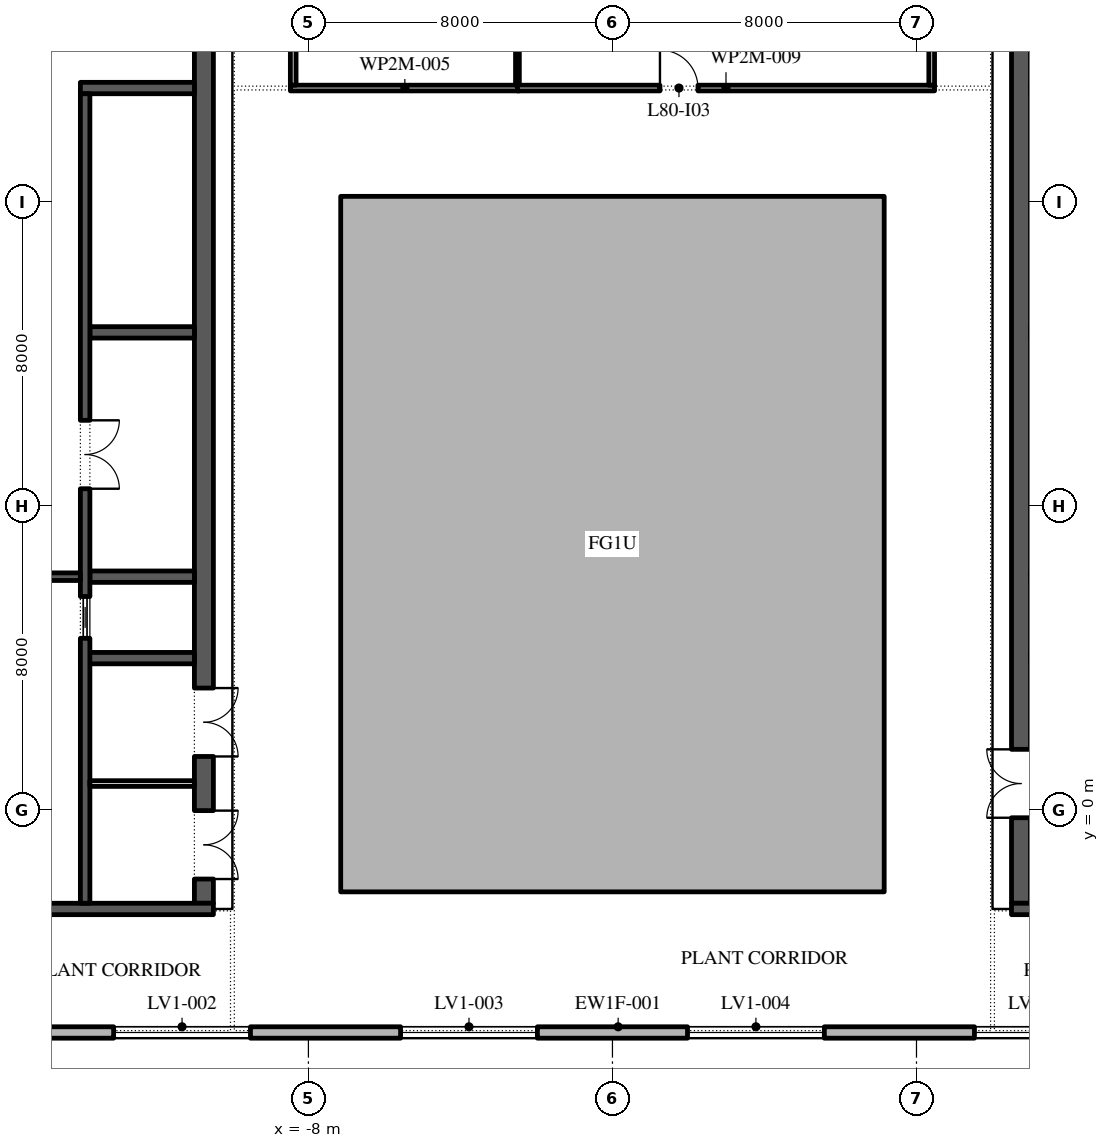
"""IFC4 building model, lengths in metres.
Left out: names, types, materials, properties, quantities, classifications, styles, units other than length and angle.
Written with IfcOpenShell. Run it as: python <this file> out.ifc"""

import sys

from ifc_helpers import new_model, si_unit, direction, frame, frame_2d, origin, place, context, subcontext, project, spatial, polyline, rectangle, outline, extrude, element, fill, save


model = new_model("IFC4")
c1 = context("Model", 3, precision=1e-05, world=origin(), true_north=direction((0.0, 1.0)))
c2 = subcontext(c1, "Body", "Model", "MODEL_VIEW")
j1 = project(units=[si_unit("LENGTHUNIT", "METRE"), si_unit("PLANEANGLEUNIT", "RADIAN")], contexts=[c1])
p1 = place(None, origin())
s1 = spatial("IfcSite", under=j1, at=p1, CompositionType="ELEMENT")
p2 = place(p1, origin())
s2 = spatial("IfcBuilding", under=s1, at=p2, CompositionType="ELEMENT")
p3 = place(p2, frame((0.0, 0.0, 363.6)))
s3 = spatial("IfcBuildingStorey", under=s2, at=p3, CompositionType="ELEMENT", Elevation=363.6)
p4 = place(p3, origin())
e1 = element("IfcWall", 1, at=p4, inside=s3, PredefinedType="STANDARD", context=c2, shape_type="SweptSolid", body=[
    extrude(outline(polyline([(-7.15, -2.15), (7.15, -2.15), (7.15, 16.15), (-7.15, 16.15), (-7.15, -2.15)]), holes=[polyline([(-7.0, -2.0), (-7.0, 16.0), (7.0, 16.0), (7.0, -2.0), (-7.0, -2.0)])]), origin(), (0.0, 0.0, 1.0), 5.2),
])
p5 = place(p3, frame((-22.35, -5.85, 0.0), z_axis=(0.0, 0.0, 1.0), x_axis=(1.0, 0.0, 0.0)))
e2 = element("IfcWall", 2, at=p5, inside=s3, PredefinedType="STANDARD", context=c2, shape_type="SweptSolid", body=[
    extrude(rectangle(XDim=45.0, YDim=0.3, at=frame_2d((22.5, 0.0))), origin(), (0.0, 0.0, 1.0), 5.2),
])
p6 = place(p5, frame((1.825, 0.0, 0.6)))
e3 = element("IfcOpeningElement", 3, at=p6, cuts=e2, PredefinedType="OPENING", context=c2, shape_type="SweptSolid", body=[
    extrude(rectangle(XDim=3.6, YDim=4.15, at=frame_2d((1.8, 2.075))), frame((0.0, 0.16, 0.0), z_axis=(0.0, -1.0, 0.0), x_axis=(1.0, 0.0, 0.0)), (0.0, 0.0, 1.0), 0.32),
])
p7 = place(p5, frame((9.225, 0.0, 0.6)))
e4 = element("IfcOpeningElement", 4, at=p7, cuts=e2, PredefinedType="OPENING", context=c2, shape_type="SweptSolid", body=[
    extrude(rectangle(XDim=3.6, YDim=4.15, at=frame_2d((1.8, 2.075))), frame((0.0, 0.16, 0.0), z_axis=(0.0, -1.0, 0.0), x_axis=(1.0, 0.0, 0.0)), (0.0, 0.0, 1.0), 0.32),
])
p8 = place(p5, frame((16.775, 0.0, 0.6)))
e5 = element("IfcOpeningElement", 5, at=p8, cuts=e2, PredefinedType="OPENING", context=c2, shape_type="SweptSolid", body=[
    extrude(rectangle(XDim=3.6, YDim=4.15, at=frame_2d((1.8, 2.075))), frame((0.0, 0.16, 0.0), z_axis=(0.0, -1.0, 0.0), x_axis=(1.0, 0.0, 0.0)), (0.0, 0.0, 1.0), 0.32),
])
p9 = place(p5, frame((24.325, 0.0, 0.6)))
e6 = element("IfcOpeningElement", 6, at=p9, cuts=e2, PredefinedType="OPENING", context=c2, shape_type="SweptSolid", body=[
    extrude(rectangle(XDim=3.6, YDim=4.15, at=frame_2d((1.8, 2.075))), frame((0.0, 0.16, 0.0), z_axis=(0.0, -1.0, 0.0), x_axis=(1.0, 0.0, 0.0)), (0.0, 0.0, 1.0), 0.32),
])
p10 = place(p5, frame((31.875, 0.0, 0.6)))
e7 = element("IfcOpeningElement", 7, at=p10, cuts=e2, PredefinedType="OPENING", context=c2, shape_type="SweptSolid", body=[
    extrude(rectangle(XDim=3.6, YDim=4.15, at=frame_2d((1.8, 2.075))), frame((0.0, 0.16, 0.0), z_axis=(0.0, -1.0, 0.0), x_axis=(1.0, 0.0, 0.0)), (0.0, 0.0, 1.0), 0.32),
])
p11 = place(p5, frame((39.425, 0.0, 0.6)))
e8 = element("IfcOpeningElement", 8, at=p11, cuts=e2, PredefinedType="OPENING", context=c2, shape_type="SweptSolid", body=[
    extrude(rectangle(XDim=3.6, YDim=4.15, at=frame_2d((1.8, 2.075))), frame((0.0, 0.16, 0.0), z_axis=(0.0, -1.0, 0.0), x_axis=(1.0, 0.0, 0.0)), (0.0, 0.0, 1.0), 0.32),
])
p12 = place(p3, frame((-10.75, -2.45, 0.0), z_axis=(0.0, 0.0, 1.0), x_axis=(0.0, 1.0, 0.0)))
e9 = element("IfcWall", 9, at=p12, inside=s3, PredefinedType="SHEAR", context=c2, shape_type="SweptSolid", body=[
    extrude(rectangle(XDim=27.9, YDim=0.5, at=frame_2d((13.95, 0.0))), origin(), (0.0, 0.0, 1.0), 5.2),
])
p13 = place(p12, frame((23.65, 0.0, 0.0)))
e10 = element("IfcOpeningElement", 10, at=p13, cuts=e9, PredefinedType="OPENING", context=c2, shape_type="SweptSolid", body=[
    extrude(rectangle(XDim=2.4, YDim=2.1, at=frame_2d((1.2, 1.05))), frame((0.0, 0.26, 0.0), z_axis=(0.0, -1.0, 0.0), x_axis=(1.0, 0.0, 0.0)), (0.0, 0.0, 1.0), 0.52),
])
p14 = place(p12, frame((0.637, 0.0, 0.0)))
e11 = element("IfcOpeningElement", 11, at=p14, cuts=e9, PredefinedType="OPENING", context=c2, shape_type="SweptSolid", body=[
    extrude(rectangle(XDim=1.8, YDim=2.4, at=frame_2d((0.9, 1.2))), frame((0.0, 0.26, 0.0), z_axis=(0.0, -1.0, 0.0), x_axis=(1.0, 0.0, 0.0)), (0.0, 0.0, 1.0), 0.52),
])
p15 = place(p12, frame((3.863, 0.0, 0.0)))
e12 = element("IfcOpeningElement", 12, at=p15, cuts=e9, PredefinedType="OPENING", context=c2, shape_type="SweptSolid", body=[
    extrude(rectangle(XDim=1.8, YDim=2.4, at=frame_2d((0.9, 1.2))), frame((0.0, 0.26, 0.0), z_axis=(0.0, -1.0, 0.0), x_axis=(1.0, 0.0, 0.0)), (0.0, 0.0, 1.0), 0.52),
])
p16 = place(p3, frame((-21.5, -2.6, 0.0), z_axis=(0.0, 0.0, 1.0), x_axis=(1.0, 0.0, 0.0)))
e13 = element("IfcWall", 13, at=p16, inside=s3, PredefinedType="SHEAR", context=c2, shape_type="SweptSolid", body=[
    extrude(rectangle(XDim=11.0, YDim=0.3, at=frame_2d((5.5, 0.0))), origin(), (0.0, 0.0, 1.0), 5.2),
])
p17 = place(p3, frame((-14.0, 4.0, 0.0), z_axis=(0.0, 0.0, 1.0), x_axis=(1.0, 0.0, 0.0)))
e14 = element("IfcWall", 14, at=p17, inside=s3, PredefinedType="SHEAR", context=c2, shape_type="SweptSolid", body=[
    extrude(rectangle(XDim=3.0, YDim=0.3, at=frame_2d((1.5, 0.0))), origin(), (0.0, 0.0, 1.0), 5.2),
])
for number, where, z_axis, x_axis in (
    (15, (-13.75, 6.143, 0.0), (0.0, 0.0, 1.0), (1.0, 0.0, 0.0)),
    (16, (-13.75, 12.571, 0.0), (0.0, 0.0, 1.0), (1.0, 0.0, 0.0)),
):
    element("IfcWall", number, at=place(p3, frame(where, z_axis=z_axis, x_axis=x_axis)), inside=s3, PredefinedType="SHEAR", context=c2, shape_type="SweptSolid", body=[
        extrude(rectangle(XDim=2.75, YDim=0.3, at=frame_2d((1.375, 0.0))), origin(), (0.0, 0.0, 1.0), 5.2),
    ])
p18 = place(p3, frame((-14.0, 19.0, 0.0), z_axis=(0.0, 0.0, 1.0), x_axis=(1.0, 0.0, 0.0)))
e17 = element("IfcWall", 17, at=p18, inside=s3, PredefinedType="SHEAR", context=c2, shape_type="SweptSolid", body=[
    extrude(rectangle(XDim=3.0, YDim=0.3, at=frame_2d((1.5, 0.0))), origin(), (0.0, 0.0, 1.0), 5.2),
])
p19 = place(p3, frame((-13.875, -2.45, 0.0), z_axis=(0.0, 0.0, 1.0), x_axis=(0.0, 1.0, 0.0)))
e18 = element("IfcWall", 18, at=p19, inside=s3, PredefinedType="SHEAR", context=c2, shape_type="SweptSolid", body=[
    extrude(rectangle(XDim=21.3, YDim=0.25, at=frame_2d((10.65, 0.0))), origin(), (0.0, 0.0, 1.0), 5.2),
])
p20 = place(p19, frame((10.907, 0.0, 0.0)))
e19 = element("IfcOpeningElement", 19, at=p20, cuts=e18, PredefinedType="OPENING", context=c2, shape_type="SweptSolid", body=[
    extrude(rectangle(XDim=1.8, YDim=2.4, at=frame_2d((0.9, 1.2))), frame((0.0, 0.135, 0.0), z_axis=(0.0, -1.0, 0.0), x_axis=(1.0, 0.0, 0.0)), (0.0, 0.0, 1.0), 0.27),
])
p21 = place(p19, frame((6.971, 0.0, 0.0)))
e20 = element("IfcOpeningElement", 20, at=p21, cuts=e18, PredefinedType="OPENING", context=c2, shape_type="SweptSolid", body=[
    extrude(rectangle(XDim=1.1, YDim=2.1, at=frame_2d((0.55, 1.05))), frame((0.0, 0.135, 0.0), z_axis=(0.0, -1.0, 0.0), x_axis=(1.0, 0.0, 0.0)), (0.0, 0.0, 1.0), 0.27),
])
p22 = place(p3, frame((-18.0, 6.143, 0.0), z_axis=(0.0, 0.0, 1.0), x_axis=(1.0, 0.0, 0.0)))
e21 = element("IfcWall", 21, at=p22, inside=s3, PredefinedType="SHEAR", context=c2, shape_type="SweptSolid", body=[
    extrude(rectangle(XDim=4.0, YDim=0.2, at=frame_2d((2.0, 0.0))), origin(), (0.0, 0.0, 1.0), 5.2),
])
p23 = place(p22, frame((1.4, 0.0, 0.0)))
e22 = element("IfcOpeningElement", 22, at=p23, cuts=e21, PredefinedType="OPENING", context=c2, shape_type="SweptSolid", body=[
    extrude(rectangle(XDim=1.2, YDim=2.1, at=frame_2d((0.6, 1.05))), frame((0.0, 0.11, 0.0), z_axis=(0.0, -1.0, 0.0), x_axis=(1.0, 0.0, 0.0)), (0.0, 0.0, 1.0), 0.22),
])
p24 = place(p3, frame((-13.75, 0.7, 0.0), z_axis=(0.0, 0.0, 1.0), x_axis=(1.0, 0.0, 0.0)))
e23 = element("IfcWall", 23, at=p24, inside=s3, PredefinedType="PARTITIONING", context=c2, shape_type="SweptSolid", body=[
    extrude(rectangle(XDim=2.75, YDim=0.15, at=frame_2d((1.375, 0.0))), origin(), (0.0, 0.0, 1.0), 5.2),
])
p25 = place(p3, frame((10.75, -2.45, 0.0), z_axis=(0.0, 0.0, 1.0), x_axis=(0.0, 1.0, 0.0)))
e24 = element("IfcWall", 24, at=p25, inside=s3, PredefinedType="SHEAR", context=c2, shape_type="SweptSolid", body=[
    extrude(rectangle(XDim=27.9, YDim=0.5, at=frame_2d((13.95, 0.0))), origin(), (0.0, 0.0, 1.0), 5.2),
])
p26 = place(p25, frame((23.65, 0.0, 0.0)))
e25 = element("IfcOpeningElement", 25, at=p26, cuts=e24, PredefinedType="OPENING", context=c2, shape_type="SweptSolid", body=[
    extrude(rectangle(XDim=2.4, YDim=2.1, at=frame_2d((1.2, 1.05))), frame((0.0, 0.26, 0.0), z_axis=(0.0, -1.0, 0.0), x_axis=(1.0, 0.0, 0.0)), (0.0, 0.0, 1.0), 0.52),
])
p27 = place(p25, frame((2.25, 0.0, 0.0)))
e26 = element("IfcOpeningElement", 26, at=p27, cuts=e24, PredefinedType="OPENING", context=c2, shape_type="SweptSolid", body=[
    extrude(rectangle(XDim=1.8, YDim=2.4, at=frame_2d((0.9, 1.2))), frame((0.0, 0.26, 0.0), z_axis=(0.0, -1.0, 0.0), x_axis=(1.0, 0.0, 0.0)), (0.0, 0.0, 1.0), 0.52),
])
p28 = place(p3, frame((10.5, -2.6, 0.0), z_axis=(0.0, 0.0, 1.0), x_axis=(1.0, 0.0, 0.0)))
e27 = element("IfcWall", 27, at=p28, inside=s3, PredefinedType="SHEAR", context=c2, shape_type="SweptSolid", body=[
    extrude(rectangle(XDim=11.0, YDim=0.3, at=frame_2d((5.5, 0.0))), origin(), (0.0, 0.0, 1.0), 5.2),
])
p29 = place(p3, frame((-8.475, 19.0, 0.0), z_axis=(0.0, 0.0, 1.0), x_axis=(1.0, 0.0, 0.0)))
e28 = element("IfcWall", 28, at=p29, inside=s3, PredefinedType="PARTITIONING", context=c2, shape_type="SweptSolid", body=[
    extrude(rectangle(XDim=6.025, YDim=0.15, at=frame_2d((3.013, 0.0))), origin(), (0.0, 0.0, 1.0), 5.2),
])
p30 = place(p3, frame((-8.4, 41.075, 0.0), z_axis=(0.0, 0.0, 1.0), x_axis=(0.0, -1.0, 0.0)))
e29 = element("IfcWall", 29, at=p30, inside=s3, PredefinedType="PARTITIONING", context=c2, shape_type="SweptSolid", body=[
    extrude(rectangle(XDim=22.0, YDim=0.15, at=frame_2d((11.0, 0.0))), origin(), (0.0, 0.0, 1.0), 5.2),
])
p31 = place(p30, frame((14.925, 0.0, 0.0)))
e30 = element("IfcOpeningElement", 30, at=p31, cuts=e29, PredefinedType="OPENING", context=c2, shape_type="SweptSolid", body=[
    extrude(rectangle(XDim=1.0, YDim=2.1, at=frame_2d((0.5, 1.05))), frame((0.0, 0.085, 0.0), z_axis=(0.0, -1.0, 0.0), x_axis=(1.0, 0.0, 0.0)), (0.0, 0.0, 1.0), 0.17),
])
p32 = place(p3, frame((-2.5, 19.075, 0.0), z_axis=(0.0, 0.0, 1.0), x_axis=(0.0, 1.0, 0.0)))
e31 = element("IfcWall", 31, at=p32, inside=s3, PredefinedType="PARTITIONING", context=c2, shape_type="SweptSolid", body=[
    extrude(rectangle(XDim=6.67, YDim=0.1, at=frame_2d((3.335, 0.0))), origin(), (0.0, 0.0, 1.0), 5.2),
])
p33 = place(p3, frame((-2.5, 19.0, 0.0), z_axis=(0.0, 0.0, 1.0), x_axis=(1.0, 0.0, 0.0)))
e32 = element("IfcWall", 32, at=p33, inside=s3, PredefinedType="PARTITIONING", context=c2, shape_type="SweptSolid", body=[
    extrude(rectangle(XDim=10.975, YDim=0.15, at=frame_2d((5.488, 0.0))), origin(), (0.0, 0.0, 1.0), 5.2),
])
p34 = place(p33, frame((3.75, 0.0, 0.0)))
e33 = element("IfcOpeningElement", 33, at=p34, cuts=e32, PredefinedType="OPENING", context=c2, shape_type="SweptSolid", body=[
    extrude(rectangle(XDim=1.0, YDim=2.1, at=frame_2d((0.5, 1.05))), frame((0.0, 0.085, 0.0), z_axis=(0.0, -1.0, 0.0), x_axis=(1.0, 0.0, 0.0)), (0.0, 0.0, 1.0), 0.17),
])
p35 = place(p3, frame((8.4, 19.075, 0.0), z_axis=(0.0, 0.0, 1.0), x_axis=(0.0, 1.0, 0.0)))
e34 = element("IfcWall", 34, at=p35, inside=s3, PredefinedType="PARTITIONING", context=c2, shape_type="SweptSolid", body=[
    extrude(rectangle(XDim=7.375, YDim=0.15, at=frame_2d((3.688, 0.0))), origin(), (0.0, 0.0, 1.0), 5.2),
])
p36 = place(p7, origin())
e35 = element("IfcWindow", 35, at=p36, inside=s3, PartitioningType="DOUBLE_PANEL_HORIZONTAL", PredefinedType="WINDOW", context=c2, shape_type="SweptSolid", body=[
    extrude(rectangle(XDim=3.6, YDim=4.15, at=frame_2d((1.8, 2.075))), frame((0.0, 0.03, 0.0), z_axis=(0.0, -1.0, 0.0), x_axis=(1.0, 0.0, 0.0)), (0.0, 0.0, 1.0), 0.06),
])
fill(e4, e35)
p37 = place(p8, origin())
e36 = element("IfcWindow", 36, at=p37, inside=s3, PartitioningType="DOUBLE_PANEL_HORIZONTAL", PredefinedType="WINDOW", context=c2, shape_type="SweptSolid", body=[
    extrude(rectangle(XDim=3.6, YDim=4.15, at=frame_2d((1.8, 2.075))), frame((0.0, 0.03, 0.0), z_axis=(0.0, -1.0, 0.0), x_axis=(1.0, 0.0, 0.0)), (0.0, 0.0, 1.0), 0.06),
])
fill(e5, e36)
p38 = place(p9, origin())
e37 = element("IfcWindow", 37, at=p38, inside=s3, PartitioningType="DOUBLE_PANEL_HORIZONTAL", PredefinedType="WINDOW", context=c2, shape_type="SweptSolid", body=[
    extrude(rectangle(XDim=3.6, YDim=4.15, at=frame_2d((1.8, 2.075))), frame((0.0, 0.03, 0.0), z_axis=(0.0, -1.0, 0.0), x_axis=(1.0, 0.0, 0.0)), (0.0, 0.0, 1.0), 0.06),
])
fill(e6, e37)
p39 = place(p10, origin())
e38 = element("IfcWindow", 38, at=p39, inside=s3, PartitioningType="DOUBLE_PANEL_HORIZONTAL", PredefinedType="WINDOW", context=c2, shape_type="SweptSolid", body=[
    extrude(rectangle(XDim=3.6, YDim=4.15, at=frame_2d((1.8, 2.075))), frame((0.0, 0.03, 0.0), z_axis=(0.0, -1.0, 0.0), x_axis=(1.0, 0.0, 0.0)), (0.0, 0.0, 1.0), 0.06),
])
fill(e7, e38)
p40 = place(p20, frame((1.8, -0.2, 0.0), z_axis=(0.0, 0.0, 1.0), x_axis=(-1.0, 0.0, 0.0)))
e39 = element("IfcDoor", 39, at=p40, inside=s3, OperationType="DOUBLE_DOOR_SINGLE_SWING", PredefinedType="DOOR", context=c2, shape_type="SweptSolid", body=[
    extrude(rectangle(XDim=1.8, YDim=2.4, at=frame_2d((0.9, 1.2))), frame((0.0, -0.075, 0.0), z_axis=(0.0, -1.0, 0.0), x_axis=(1.0, 0.0, 0.0)), (0.0, 0.0, 1.0), 0.05),
])
fill(e19, e39)
p41 = place(p21, origin())
e40 = element("IfcDoor", 40, at=p41, inside=s3, OperationType="SLIDING_TO_LEFT", PredefinedType="DOOR", context=c2, shape_type="SweptSolid", body=[
    extrude(rectangle(XDim=1.1, YDim=2.1, at=frame_2d((0.55, 1.05))), frame((0.0, 0.025, 0.0), z_axis=(0.0, -1.0, 0.0), x_axis=(1.0, 0.0, 0.0)), (0.0, 0.0, 1.0), 0.05),
])
fill(e20, e40)
p42 = place(p14, frame((1.8, 0.45, 0.0), z_axis=(0.0, 0.0, 1.0), x_axis=(-1.0, 0.0, 0.0)))
e41 = element("IfcDoor", 41, at=p42, inside=s3, OperationType="DOUBLE_DOOR_SINGLE_SWING", PredefinedType="DOOR", context=c2, shape_type="SweptSolid", body=[
    extrude(rectangle(XDim=1.8, YDim=2.4, at=frame_2d((0.9, 1.2))), frame((0.0, 0.25, 0.0), z_axis=(0.0, -1.0, 0.0), x_axis=(1.0, 0.0, 0.0)), (0.0, 0.0, 1.0), 0.05),
])
fill(e11, e41)
p43 = place(p15, frame((1.8, 0.45, 0.0), z_axis=(0.0, 0.0, 1.0), x_axis=(-1.0, 0.0, 0.0)))
e42 = element("IfcDoor", 42, at=p43, inside=s3, OperationType="DOUBLE_DOOR_SINGLE_SWING", PredefinedType="DOOR", context=c2, shape_type="SweptSolid", body=[
    extrude(rectangle(XDim=1.8, YDim=2.4, at=frame_2d((0.9, 1.2))), frame((0.0, 0.25, 0.0), z_axis=(0.0, -1.0, 0.0), x_axis=(1.0, 0.0, 0.0)), (0.0, 0.0, 1.0), 0.05),
])
fill(e12, e42)
p44 = place(p34, origin())
e43 = element("IfcDoor", 43, at=p44, inside=s3, OperationType="SINGLE_SWING_RIGHT", PredefinedType="DOOR", context=c2, shape_type="SweptSolid", body=[
    extrude(rectangle(XDim=1.0, YDim=2.1, at=frame_2d((0.5, 1.05))), frame((0.0, 0.025, 0.0), z_axis=(0.0, -1.0, 0.0), x_axis=(1.0, 0.0, 0.0)), (0.0, 0.0, 1.0), 0.05),
])
fill(e33, e43)
save(model, sys.argv[1])
